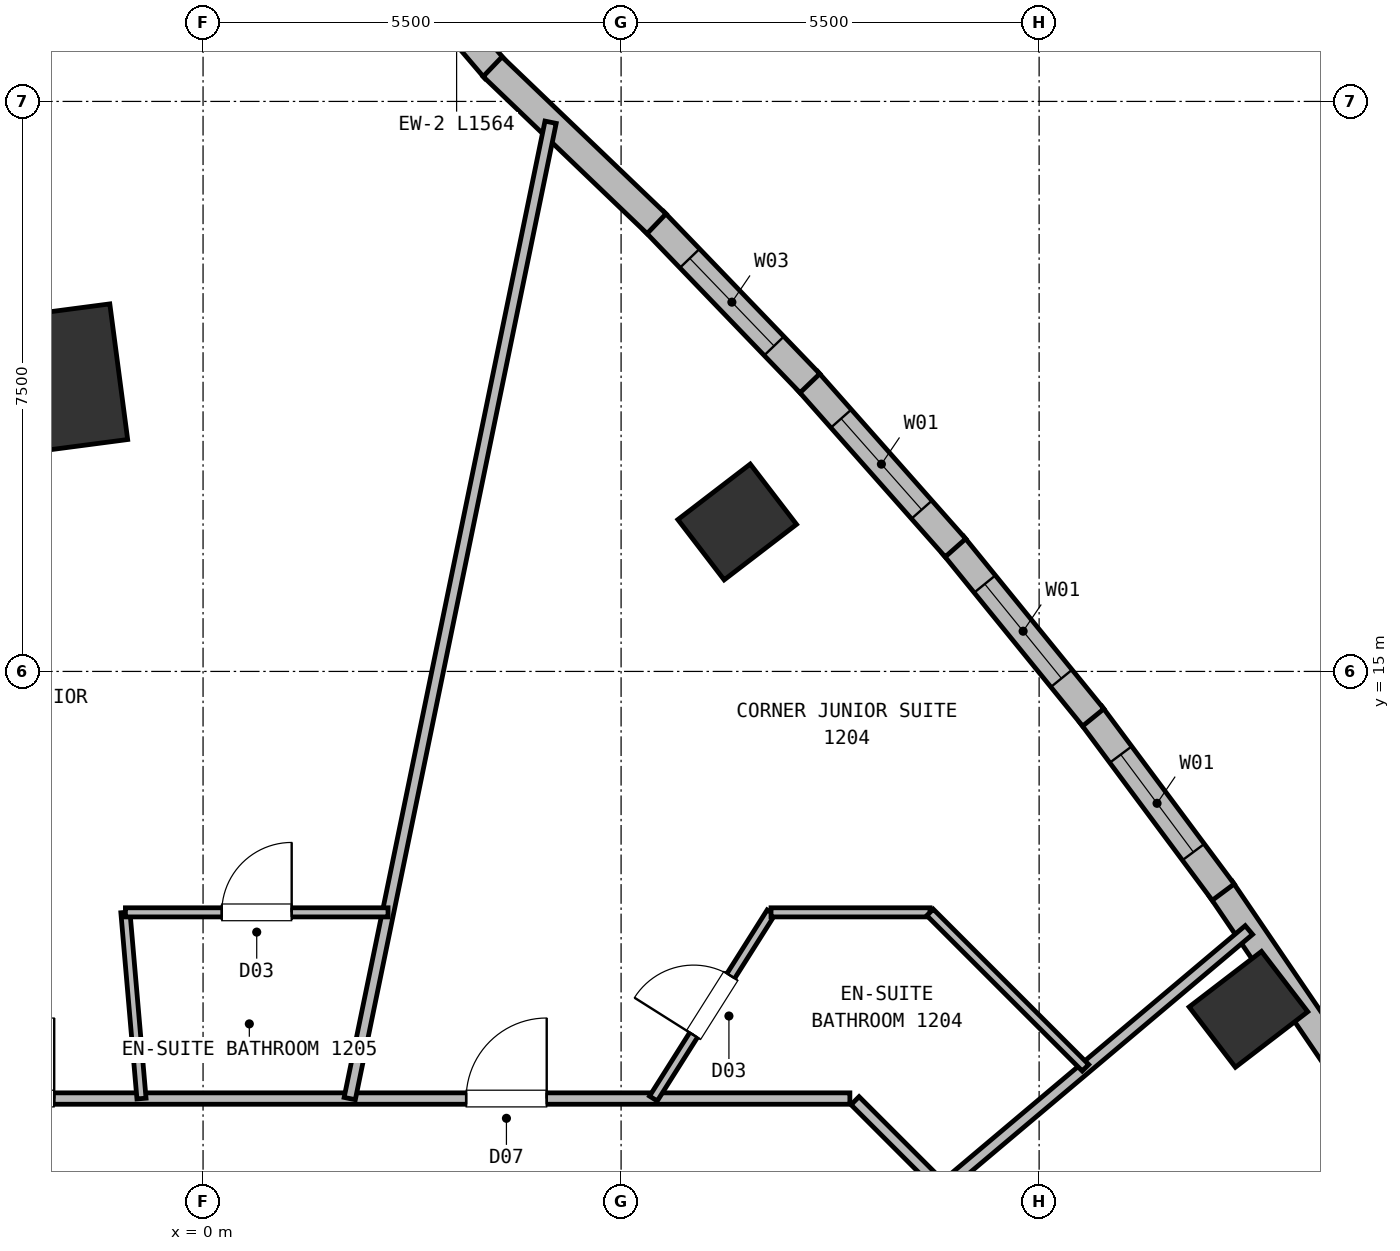
"""IFC4 building model, lengths in metres.
Left out: names, types, materials, properties, quantities, classifications, styles, units other than length and angle.
Written with IfcOpenShell. Run it as: python <this file> out.ifc"""

import sys

from ifc_helpers import new_model, si_unit, direction, frame, frame_2d, origin, origin_2d, place, context, subcontext, project, spatial, rectangle, extrude, element, fill, save


model = new_model("IFC4")
c1 = context("Model", 3, precision=1e-05, world=origin(), true_north=direction((0.0, 1.0)))
c2 = subcontext(c1, "Body", "Model", "MODEL_VIEW")
j1 = project(units=[si_unit("LENGTHUNIT", "METRE"), si_unit("PLANEANGLEUNIT", "RADIAN")], contexts=[c1])
p1 = place(None, origin())
s1 = spatial("IfcSite", under=j1, at=p1, CompositionType="ELEMENT")
p2 = place(p1, origin())
s2 = spatial("IfcBuilding", under=s1, at=p2, CompositionType="ELEMENT")
p3 = place(p2, frame((0.0, 0.0, 41.75)))
s3 = spatial("IfcBuildingStorey", under=s2, at=p3, CompositionType="ELEMENT", Elevation=41.75)
p4 = place(p3, frame((-2.2, 18.8, 0.0), z_axis=(0.0, 0.0, 1.0), x_axis=(-0.13052619222, 0.991444861374, 0.0)))
e1 = element("IfcColumn", 1, at=p4, inside=s3, PredefinedType="COLUMN", context=c2, shape_type="SweptSolid", body=[
    extrude(rectangle(XDim=1.8, YDim=2.2, at=origin_2d()), origin(), (0.0, 0.0, 1.0), 3.75),
])
for number, where, z_axis, x_axis in (
    (2, (13.754, 10.554, 0.0), (0.0, 0.0, 1.0), (-0.609, 0.793, 0.0)),
    (3, (7.028, 16.966, 0.0), (0.0, 0.0, 1.0), (-0.609, 0.793, 0.0)),
):
    element("IfcColumn", number, at=place(p3, frame(where, z_axis=z_axis, x_axis=x_axis)), inside=s3, PredefinedType="COLUMN", context=c2, shape_type="SweptSolid", body=[
        extrude(rectangle(XDim=1.0, YDim=1.2, at=origin_2d()), origin(), (0.0, 0.0, 1.0), 3.75),
    ])
p5 = place(p3, frame((2.828, 24.11, 0.0), z_axis=(0.0, 0.0, 1.0), x_axis=(0.649427555808, -0.76042346739, 0.0)))
e4 = element("IfcWall", 4, at=p5, inside=s3, PredefinedType="SOLIDWALL", context=c2, shape_type="SweptSolid", body=[
    extrude(rectangle(XDim=1.564, YDim=0.36, at=frame_2d((0.782, 0.0))), origin(), (0.0, 0.0, 1.0), 3.5),
])
p6 = place(p3, frame((13.393, 12.136, 0.0), z_axis=(0.0, 0.0, 1.0), x_axis=(0.562401815537, -0.82686407461, 0.0)))
e5 = element("IfcWall", 5, at=p6, inside=s3, PredefinedType="SOLIDWALL", context=c2, shape_type="SweptSolid", body=[
    extrude(rectangle(XDim=2.91, YDim=0.36, at=frame_2d((1.455, 0.0))), origin(), (0.0, 0.0, 1.0), 3.5),
])
p7 = place(p3, frame((11.681, 14.434, 0.0), z_axis=(0.0, 0.0, 1.0), x_axis=(0.597208824727, -0.802085793209, 0.0)))
e6 = element("IfcWall", 6, at=p7, inside=s3, PredefinedType="SOLIDWALL", context=c2, shape_type="SweptSolid", body=[
    extrude(rectangle(XDim=2.915, YDim=0.36, at=frame_2d((1.458, 0.0))), origin(), (0.0, 0.0, 1.0), 3.5),
])
p8 = place(p7, frame((0.657, 0.0, 0.72)))
e7 = element("IfcOpeningElement", 7, at=p8, cuts=e6, PredefinedType="OPENING", context=c2, shape_type="SweptSolid", body=[
    extrude(rectangle(XDim=1.6, YDim=1.88, at=frame_2d((0.8, 0.94))), frame((0.0, 0.19, 0.0), z_axis=(0.0, -1.0, 0.0), x_axis=(1.0, 0.0, 0.0)), (0.0, 0.0, 1.0), 0.38),
])
p9 = place(p3, frame((9.867, 16.664, 0.0), z_axis=(0.0, 0.0, 1.0), x_axis=(0.630712015434, -0.776016980218, 0.0)))
e8 = element("IfcWall", 8, at=p9, inside=s3, PredefinedType="SOLIDWALL", context=c2, shape_type="SweptSolid", body=[
    extrude(rectangle(XDim=2.925, YDim=0.36, at=frame_2d((1.463, 0.0))), origin(), (0.0, 0.0, 1.0), 3.5),
])
p10 = place(p9, frame((0.663, 0.0, 0.72)))
e9 = element("IfcOpeningElement", 9, at=p10, cuts=e8, PredefinedType="OPENING", context=c2, shape_type="SweptSolid", body=[
    extrude(rectangle(XDim=1.6, YDim=1.88, at=frame_2d((0.8, 0.94))), frame((0.0, 0.19, 0.0), z_axis=(0.0, -1.0, 0.0), x_axis=(1.0, 0.0, 0.0)), (0.0, 0.0, 1.0), 0.38),
])
p11 = place(p3, frame((7.95, 18.828, 0.0), z_axis=(0.0, 0.0, 1.0), x_axis=(0.662795962661, -0.748800047997, 0.0)))
e10 = element("IfcWall", 10, at=p11, inside=s3, PredefinedType="SOLIDWALL", context=c2, shape_type="SweptSolid", body=[
    extrude(rectangle(XDim=2.941, YDim=0.36, at=frame_2d((1.47, 0.0))), origin(), (0.0, 0.0, 1.0), 3.5),
])
p12 = place(p11, frame((0.67, 0.0, 0.72)))
e11 = element("IfcOpeningElement", 11, at=p12, cuts=e10, PredefinedType="OPENING", context=c2, shape_type="SweptSolid", body=[
    extrude(rectangle(XDim=1.6, YDim=1.88, at=frame_2d((0.8, 0.94))), frame((0.0, 0.19, 0.0), z_axis=(0.0, -1.0, 0.0), x_axis=(1.0, 0.0, 0.0)), (0.0, 0.0, 1.0), 0.38),
])
p13 = place(p3, frame((5.931, 20.926, 0.0), z_axis=(0.0, 0.0, 1.0), x_axis=(0.693247098046, -0.720699979916, 0.0)))
e12 = element("IfcWall", 12, at=p13, inside=s3, PredefinedType="SOLIDWALL", context=c2, shape_type="SweptSolid", body=[
    extrude(rectangle(XDim=2.961, YDim=0.36, at=frame_2d((1.481, 0.0))), origin(), (0.0, 0.0, 1.0), 3.5),
])
p14 = place(p13, frame((0.681, 0.0, 0.72)))
e13 = element("IfcOpeningElement", 13, at=p14, cuts=e12, PredefinedType="OPENING", context=c2, shape_type="SweptSolid", body=[
    extrude(rectangle(XDim=1.6, YDim=1.88, at=frame_2d((0.8, 0.94))), frame((0.0, 0.19, 0.0), z_axis=(0.0, -1.0, 0.0), x_axis=(1.0, 0.0, 0.0)), (0.0, 0.0, 1.0), 0.38),
])
p15 = place(p3, frame((3.81, 22.957, 0.0), z_axis=(0.0, 0.0, 1.0), x_axis=(0.722146408361, -0.691740243799, 0.0)))
e14 = element("IfcWall", 14, at=p15, inside=s3, PredefinedType="SOLIDWALL", context=c2, shape_type="SweptSolid", body=[
    extrude(rectangle(XDim=2.987, YDim=0.36, at=frame_2d((1.493, 0.0))), origin(), (0.0, 0.0, 1.0), 3.5),
])
p16 = place(p3, frame((8.578, 9.352, 0.0), z_axis=(0.0, 0.0, 1.0), x_axis=(0.707067066127, -0.707146494016, 0.0)))
e15 = element("IfcWall", 15, at=p16, inside=s3, PredefinedType="PARTITIONING", context=c2, shape_type="SweptSolid", body=[
    extrude(rectangle(XDim=3.074, YDim=0.15, at=frame_2d((1.537, 0.0))), origin(), (0.0, 0.0, 1.0), 3.5),
])
p17 = place(p3, frame((-8.51, 9.38, 0.0), z_axis=(0.0, 0.0, 1.0), x_axis=(1.0, 0.0, 0.0)))
e16 = element("IfcWall", 16, at=p17, inside=s3, PredefinedType="PARTITIONING", context=c2, shape_type="SweptSolid", body=[
    extrude(rectangle(XDim=17.02, YDim=0.15, at=frame_2d((8.51, 0.0))), origin(), (0.0, 0.0, 1.0), 3.5),
])
p18 = place(p17, frame((11.971, 0.0, 0.0)))
e17 = element("IfcOpeningElement", 17, at=p18, cuts=e16, PredefinedType="OPENING", context=c2, shape_type="SweptSolid", body=[
    extrude(rectangle(XDim=1.06, YDim=2.15, at=frame_2d((0.53, 1.075))), frame((0.0, 0.085, 0.0), z_axis=(0.0, -1.0, 0.0), x_axis=(1.0, 0.0, 0.0)), (0.0, 0.0, 1.0), 0.17),
])
p19 = place(p17, frame((5.492, 0.0, 0.0)))
e18 = element("IfcOpeningElement", 18, at=p19, cuts=e16, PredefinedType="OPENING", context=c2, shape_type="SweptSolid", body=[
    extrude(rectangle(XDim=1.06, YDim=2.15, at=frame_2d((0.53, 1.075))), frame((0.0, 0.085, 0.0), z_axis=(0.0, -1.0, 0.0), x_axis=(1.0, 0.0, 0.0)), (0.0, 0.0, 1.0), 0.17),
])
p20 = place(p3, frame((9.729, 8.2, 0.0), z_axis=(0.0, 0.0, 1.0), x_axis=(0.764648079626, 0.644448069532, 0.0)))
e19 = element("IfcWall", 19, at=p20, inside=s3, PredefinedType="PARTITIONING", context=c2, shape_type="SweptSolid", body=[
    extrude(rectangle(XDim=5.271, YDim=0.15, at=frame_2d((2.635, 0.0))), origin(), (0.0, 0.0, 1.0), 3.5),
])
p21 = place(p3, frame((5.925, 9.38, 0.0), z_axis=(0.0, 0.0, 1.0), x_axis=(0.534021517206, 0.845470886052, 0.0)))
e20 = element("IfcWall", 20, at=p21, inside=s3, PredefinedType="PARTITIONING", context=c2, shape_type="SweptSolid", body=[
    extrude(rectangle(XDim=2.898, YDim=0.12, at=frame_2d((1.449, 0.0))), origin(), (0.0, 0.0, 1.0), 3.5),
])
p22 = place(p21, frame((0.989, 0.0, 0.0)))
e21 = element("IfcOpeningElement", 21, at=p22, cuts=e20, PredefinedType="OPENING", context=c2, shape_type="SweptSolid", body=[
    extrude(rectangle(XDim=0.92, YDim=2.1, at=frame_2d((0.46, 1.05))), frame((0.0, 0.07, 0.0), z_axis=(0.0, -1.0, 0.0), x_axis=(1.0, 0.0, 0.0)), (0.0, 0.0, 1.0), 0.14),
])
p23 = place(p3, frame((7.473, 11.83, 0.0), z_axis=(0.0, 0.0, 1.0), x_axis=(1.0, 0.0, 0.0)))
e22 = element("IfcWall", 22, at=p23, inside=s3, PredefinedType="PARTITIONING", context=c2, shape_type="SweptSolid", body=[
    extrude(rectangle(XDim=2.092, YDim=0.12, at=frame_2d((1.046, 0.0))), origin(), (0.0, 0.0, 1.0), 3.5),
])
p24 = place(p3, frame((11.61, 9.785, 0.0), z_axis=(0.0, 0.0, 1.0), x_axis=(-0.707106781187, 0.707106781187, 0.0)))
e23 = element("IfcWall", 23, at=p24, inside=s3, PredefinedType="PARTITIONING", context=c2, shape_type="SweptSolid", body=[
    extrude(rectangle(XDim=2.892, YDim=0.12, at=frame_2d((1.446, 0.0))), origin(), (0.0, 0.0, 1.0), 3.5),
])
p25 = place(p3, frame((1.93, 9.38, 0.0), z_axis=(0.0, 0.0, 1.0), x_axis=(0.201507952768, 0.979486878407, 0.0)))
e24 = element("IfcWall", 24, at=p25, inside=s3, PredefinedType="PARTITIONING", context=c2, shape_type="SweptSolid", body=[
    extrude(rectangle(XDim=13.115, YDim=0.15, at=frame_2d((6.558, 0.0))), origin(), (0.0, 0.0, 1.0), 3.5),
])
p26 = place(p3, frame((-0.81, 9.38, 0.0), z_axis=(0.0, 0.0, 1.0), x_axis=(-0.086068429702, 0.996289227789, 0.0)))
e25 = element("IfcWall", 25, at=p26, inside=s3, PredefinedType="PARTITIONING", context=c2, shape_type="SweptSolid", body=[
    extrude(rectangle(XDim=2.459, YDim=0.12, at=frame_2d((1.229, 0.0))), origin(), (0.0, 0.0, 1.0), 3.5),
])
p27 = place(p3, frame((-1.021, 11.83, 0.0), z_axis=(0.0, 0.0, 1.0), x_axis=(1.0, 0.0, 0.0)))
e26 = element("IfcWall", 26, at=p27, inside=s3, PredefinedType="PARTITIONING", context=c2, shape_type="SweptSolid", body=[
    extrude(rectangle(XDim=3.455, YDim=0.12, at=frame_2d((1.728, 0.0))), origin(), (0.0, 0.0, 1.0), 3.5),
])
p28 = place(p27, frame((1.268, 0.0, 0.0)))
e27 = element("IfcOpeningElement", 27, at=p28, cuts=e26, PredefinedType="OPENING", context=c2, shape_type="SweptSolid", body=[
    extrude(rectangle(XDim=0.92, YDim=2.1, at=frame_2d((0.46, 1.05))), frame((0.0, 0.07, 0.0), z_axis=(0.0, -1.0, 0.0), x_axis=(1.0, 0.0, 0.0)), (0.0, 0.0, 1.0), 0.14),
])
p29 = place(p8, origin())
e28 = element("IfcWindow", 28, at=p29, inside=s3, PartitioningType="SINGLE_PANEL", PredefinedType="WINDOW", context=c2, shape_type="SweptSolid", body=[
    extrude(rectangle(XDim=1.6, YDim=1.88, at=frame_2d((0.8, 0.94))), frame((0.0, 0.03, 0.0), z_axis=(0.0, -1.0, 0.0), x_axis=(1.0, 0.0, 0.0)), (0.0, 0.0, 1.0), 0.06),
])
fill(e7, e28)
p30 = place(p10, origin())
e29 = element("IfcWindow", 29, at=p30, inside=s3, PartitioningType="SINGLE_PANEL", PredefinedType="WINDOW", context=c2, shape_type="SweptSolid", body=[
    extrude(rectangle(XDim=1.6, YDim=1.88, at=frame_2d((0.8, 0.94))), frame((0.0, 0.03, 0.0), z_axis=(0.0, -1.0, 0.0), x_axis=(1.0, 0.0, 0.0)), (0.0, 0.0, 1.0), 0.06),
])
fill(e9, e29)
p31 = place(p12, origin())
e30 = element("IfcWindow", 30, at=p31, inside=s3, PartitioningType="SINGLE_PANEL", PredefinedType="WINDOW", context=c2, shape_type="SweptSolid", body=[
    extrude(rectangle(XDim=1.6, YDim=1.88, at=frame_2d((0.8, 0.94))), frame((0.0, 0.03, 0.0), z_axis=(0.0, -1.0, 0.0), x_axis=(1.0, 0.0, 0.0)), (0.0, 0.0, 1.0), 0.06),
])
fill(e11, e30)
p32 = place(p14, origin())
e31 = element("IfcWindow", 31, at=p32, inside=s3, PartitioningType="SINGLE_PANEL", PredefinedType="WINDOW", context=c2, shape_type="SweptSolid", body=[
    extrude(rectangle(XDim=1.6, YDim=1.88, at=frame_2d((0.8, 0.94))), frame((0.0, 0.03, 0.0), z_axis=(0.0, -1.0, 0.0), x_axis=(1.0, 0.0, 0.0)), (0.0, 0.0, 1.0), 0.06),
])
fill(e13, e31)
p33 = place(p22, origin())
e32 = element("IfcDoor", 32, at=p33, inside=s3, OperationType="SINGLE_SWING_LEFT", PredefinedType="DOOR", context=c2, shape_type="SweptSolid", body=[
    extrude(rectangle(XDim=0.92, YDim=2.1, at=frame_2d((0.46, 1.05))), frame((0.0, 0.025, 0.0), z_axis=(0.0, -1.0, 0.0), x_axis=(1.0, 0.0, 0.0)), (0.0, 0.0, 1.0), 0.05),
])
fill(e21, e32)
p34 = place(p28, origin())
e33 = element("IfcDoor", 33, at=p34, inside=s3, OperationType="SINGLE_SWING_RIGHT", PredefinedType="DOOR", context=c2, shape_type="SweptSolid", body=[
    extrude(rectangle(XDim=0.92, YDim=2.1, at=frame_2d((0.46, 1.05))), frame((0.0, 0.025, 0.0), z_axis=(0.0, -1.0, 0.0), x_axis=(1.0, 0.0, 0.0)), (0.0, 0.0, 1.0), 0.05),
])
fill(e27, e33)
p35 = place(p18, origin())
e34 = element("IfcDoor", 34, at=p35, inside=s3, OperationType="SINGLE_SWING_RIGHT", PredefinedType="DOOR", context=c2, shape_type="SweptSolid", body=[
    extrude(rectangle(XDim=1.06, YDim=2.15, at=frame_2d((0.53, 1.075))), frame((0.0, 0.025, 0.0), z_axis=(0.0, -1.0, 0.0), x_axis=(1.0, 0.0, 0.0)), (0.0, 0.0, 1.0), 0.05),
])
fill(e17, e34)
p36 = place(p19, origin())
e35 = element("IfcDoor", 35, at=p36, inside=s3, OperationType="SINGLE_SWING_RIGHT", PredefinedType="DOOR", context=c2, shape_type="SweptSolid", body=[
    extrude(rectangle(XDim=1.06, YDim=2.15, at=frame_2d((0.53, 1.075))), frame((0.0, 0.025, 0.0), z_axis=(0.0, -1.0, 0.0), x_axis=(1.0, 0.0, 0.0)), (0.0, 0.0, 1.0), 0.05),
])
fill(e18, e35)
save(model, sys.argv[1])
